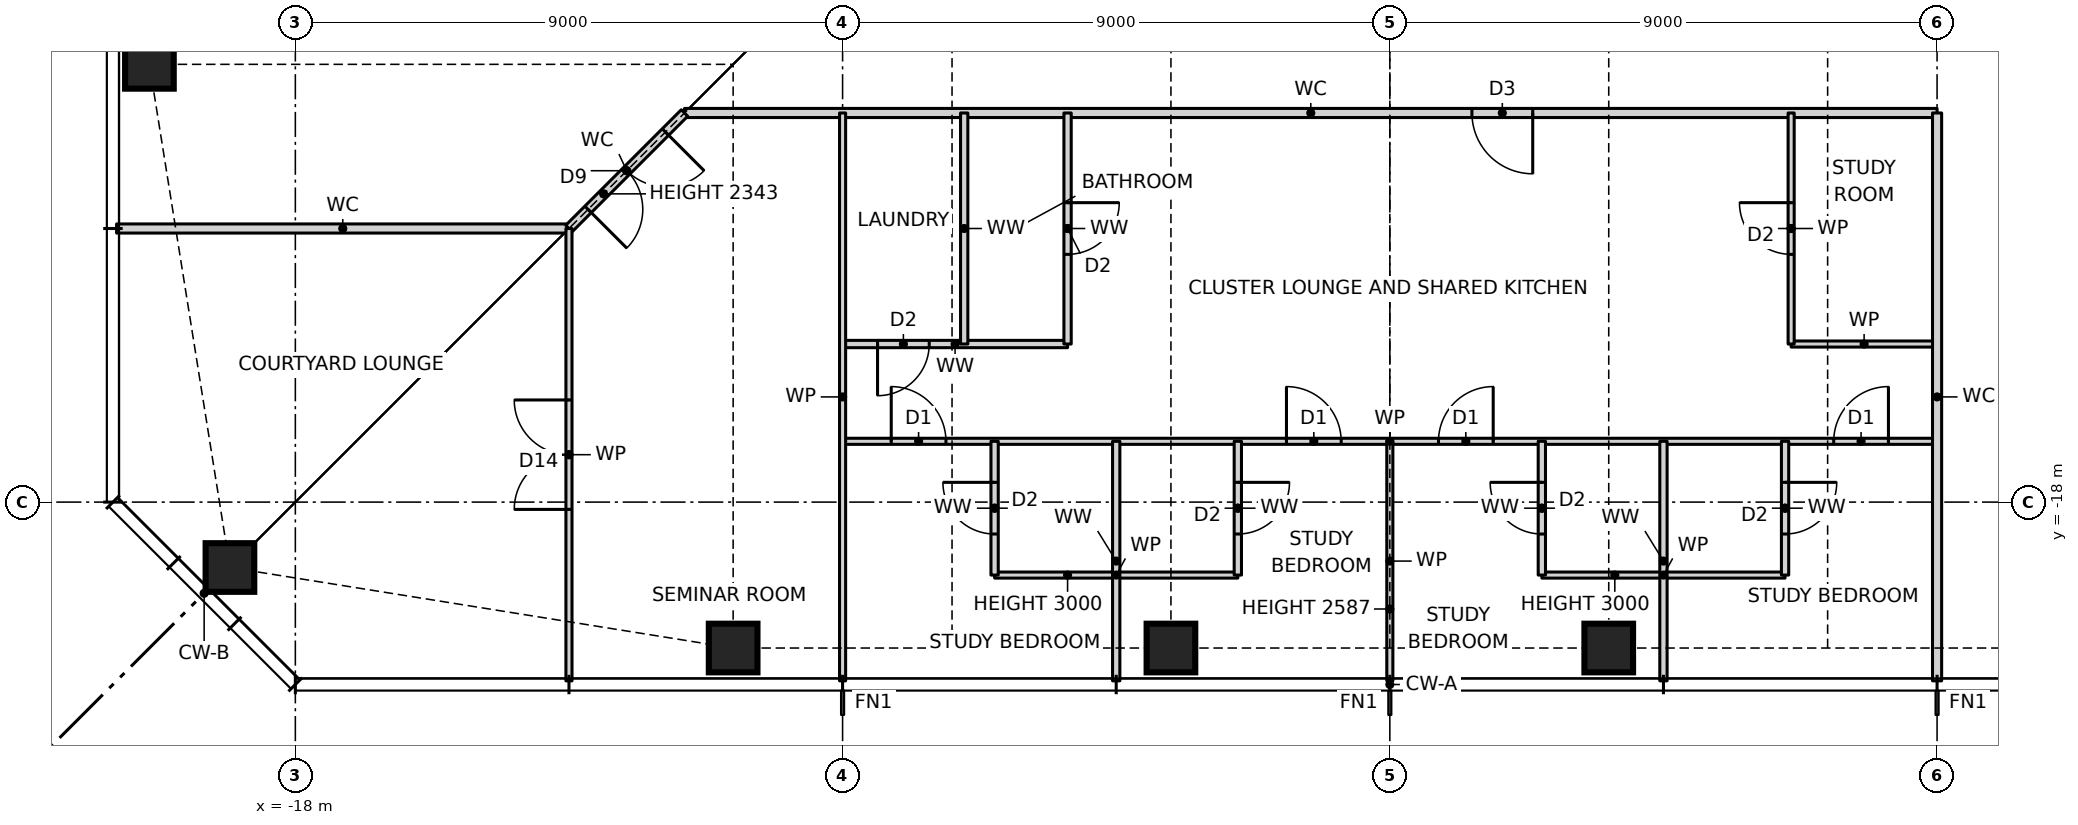
"""IFC4 building model, lengths in metres.
Left out: names, types, materials, properties, quantities, classifications, styles, units other than length and angle.
Written with IfcOpenShell. Run it as: python <this file> out.ifc"""

import sys

from ifc_helpers import new_model, si_unit, direction, frame, frame_2d, origin, origin_2d, place, context, subcontext, project, spatial, rectangle, hollow_rectangle, extrude, element, fill, save


model = new_model("IFC4")
c1 = context("Model", 3, precision=1e-05, world=origin(), true_north=direction((0.0, 1.0)))
c2 = subcontext(c1, "Body", "Model", "MODEL_VIEW")
j1 = project(units=[si_unit("LENGTHUNIT", "METRE"), si_unit("PLANEANGLEUNIT", "RADIAN")], contexts=[c1])
p1 = place(None, origin())
s1 = spatial("IfcSite", under=j1, at=p1, CompositionType="ELEMENT")
p2 = place(p1, origin())
s2 = spatial("IfcBuilding", under=s1, at=p2, CompositionType="ELEMENT")
p3 = place(p2, frame((0.0, 0.0, 94.5)))
s3 = spatial("IfcBuildingStorey", under=s2, at=p3, CompositionType="ELEMENT", Elevation=94.5)
for number, where, z_axis, x_axis in (
    (1, (-19.076, -19.076, 0.0), (0.0, 0.0, 1.0), (1.0, 0.0, 0.0)),
    (2, (-10.8, -20.4, 0.0), (0.0, 0.0, 1.0), (1.0, 0.0, 0.0)),
    (3, (-3.6, -20.4, 0.0), (0.0, 0.0, 1.0), (1.0, 0.0, 0.0)),
    (4, (3.6, -20.4, 0.0), (0.0, 0.0, 1.0), (1.0, 0.0, 0.0)),
    (5, (-20.4, -10.8, 0.0), (0.0, 0.0, 1.0), (1.0, 0.0, 0.0)),
):
    element("IfcColumn", number, at=place(p3, frame(where, z_axis=z_axis, x_axis=x_axis)), inside=s3, PredefinedType="COLUMN", context=c2, shape_type="SweptSolid", body=[
        extrude(hollow_rectangle(XDim=0.8, YDim=0.8, WallThickness=0.07, at=origin_2d()), origin(), (0.0, 0.0, 1.0), 3.5),
    ])
for number, where, z_axis, x_axis in (
    (6, (-6.5, -19.2, 0.0), (0.0, 0.0, 1.0), (1.0, 0.0, 0.0)),
    (7, (2.5, -19.2, 0.0), (0.0, 0.0, 1.0), (1.0, 0.0, 0.0)),
):
    element("IfcWall", number, at=place(p3, frame(where, z_axis=z_axis, x_axis=x_axis)), inside=s3, PredefinedType="PARTITIONING", context=c2, shape_type="SweptSolid", body=[
        extrude(rectangle(XDim=4.0, YDim=0.1, at=frame_2d((2.0, 0.0))), origin(), (0.0, 0.0, 1.0), 3.0),
    ])
p4 = place(p3, frame((-9.0, -17.0, 0.0), z_axis=(0.0, 0.0, 1.0), x_axis=(1.0, 0.0, 0.0)))
e8 = element("IfcWall", 8, at=p4, inside=s3, PredefinedType="PARTITIONING", context=c2, shape_type="SweptSolid", body=[
    extrude(rectangle(XDim=18.0, YDim=0.1, at=frame_2d((9.0, 0.0))), origin(), (0.0, 0.0, 1.0), 3.27),
])
p5 = place(p4, frame((0.8, 0.0, 0.0)))
e9 = element("IfcOpeningElement", 9, at=p5, cuts=e8, PredefinedType="OPENING", context=c2, shape_type="SweptSolid", body=[
    extrude(rectangle(XDim=0.9, YDim=2.1, at=frame_2d((0.45, 1.05))), frame((0.0, 0.06, 0.0), z_axis=(0.0, -1.0, 0.0), x_axis=(1.0, 0.0, 0.0)), (0.0, 0.0, 1.0), 0.12),
])
p6 = place(p4, frame((7.3, 0.0, 0.0)))
e10 = element("IfcOpeningElement", 10, at=p6, cuts=e8, PredefinedType="OPENING", context=c2, shape_type="SweptSolid", body=[
    extrude(rectangle(XDim=0.9, YDim=2.1, at=frame_2d((0.45, 1.05))), frame((0.0, 0.06, 0.0), z_axis=(0.0, -1.0, 0.0), x_axis=(1.0, 0.0, 0.0)), (0.0, 0.0, 1.0), 0.12),
])
p7 = place(p4, frame((9.8, 0.0, 0.0)))
e11 = element("IfcOpeningElement", 11, at=p7, cuts=e8, PredefinedType="OPENING", context=c2, shape_type="SweptSolid", body=[
    extrude(rectangle(XDim=0.9, YDim=2.1, at=frame_2d((0.45, 1.05))), frame((0.0, 0.06, 0.0), z_axis=(0.0, -1.0, 0.0), x_axis=(1.0, 0.0, 0.0)), (0.0, 0.0, 1.0), 0.12),
])
p8 = place(p4, frame((16.3, 0.0, 0.0)))
e12 = element("IfcOpeningElement", 12, at=p8, cuts=e8, PredefinedType="OPENING", context=c2, shape_type="SweptSolid", body=[
    extrude(rectangle(XDim=0.9, YDim=2.1, at=frame_2d((0.45, 1.05))), frame((0.0, 0.06, 0.0), z_axis=(0.0, -1.0, 0.0), x_axis=(1.0, 0.0, 0.0)), (0.0, 0.0, 1.0), 0.12),
])
p9 = place(p3, frame((-9.0, -15.4, 0.0), z_axis=(0.0, 0.0, 1.0), x_axis=(1.0, 0.0, 0.0)))
e13 = element("IfcWall", 13, at=p9, inside=s3, PredefinedType="PARTITIONING", context=c2, shape_type="SweptSolid", body=[
    extrude(rectangle(XDim=3.7, YDim=0.12, at=frame_2d((1.85, 0.0))), origin(), (0.0, 0.0, 1.0), 3.27),
])
p10 = place(p9, frame((0.575, 0.0, 0.0)))
e14 = element("IfcOpeningElement", 14, at=p10, cuts=e13, PredefinedType="OPENING", context=c2, shape_type="SweptSolid", body=[
    extrude(rectangle(XDim=0.85, YDim=2.1, at=frame_2d((0.425, 1.05))), frame((0.0, 0.07, 0.0), z_axis=(0.0, -1.0, 0.0), x_axis=(1.0, 0.0, 0.0)), (0.0, 0.0, 1.0), 0.14),
])
p11 = place(p3, frame((6.6, -15.4, 0.0), z_axis=(0.0, 0.0, 1.0), x_axis=(1.0, 0.0, 0.0)))
e15 = element("IfcWall", 15, at=p11, inside=s3, PredefinedType="PARTITIONING", context=c2, shape_type="SweptSolid", body=[
    extrude(rectangle(XDim=2.4, YDim=0.1, at=frame_2d((1.2, 0.0))), origin(), (0.0, 0.0, 1.0), 3.27),
])
p12 = place(p3, frame((-20.94, -13.5, 0.0), z_axis=(0.0, 0.0, 1.0), x_axis=(1.0, 0.0, 0.0)))
e16 = element("IfcWall", 16, at=p12, inside=s3, PredefinedType="PARTITIONING", context=c2, shape_type="SweptSolid", body=[
    extrude(rectangle(XDim=7.44, YDim=0.15, at=frame_2d((3.72, 0.0))), origin(), (0.0, 0.0, 1.0), 3.27),
])
p13 = place(p3, frame((-11.6, -11.6, 0.0), z_axis=(0.0, 0.0, 1.0), x_axis=(1.0, 0.0, 0.0)))
e17 = element("IfcWall", 17, at=p13, inside=s3, PredefinedType="PARTITIONING", context=c2, shape_type="SweptSolid", body=[
    extrude(rectangle(XDim=20.6, YDim=0.15, at=frame_2d((10.3, 0.0))), origin(), (0.0, 0.0, 1.0), 3.27),
])
p14 = place(p13, frame((12.95, 0.0, 0.0)))
e18 = element("IfcOpeningElement", 18, at=p14, cuts=e17, PredefinedType="OPENING", context=c2, shape_type="SweptSolid", body=[
    extrude(rectangle(XDim=1.0, YDim=2.1, at=frame_2d((0.5, 1.05))), frame((0.0, 0.085, 0.0), z_axis=(0.0, -1.0, 0.0), x_axis=(1.0, 0.0, 0.0)), (0.0, 0.0, 1.0), 0.17),
])
p15 = place(p3, frame((-13.5, -13.5, 0.0), z_axis=(0.0, 0.0, 1.0), x_axis=(0.707106781187, 0.707106781187, 0.0)))
e19 = element("IfcWall", 19, at=p15, inside=s3, PredefinedType="PARTITIONING", context=c2, shape_type="SweptSolid", body=[
    extrude(rectangle(XDim=2.687, YDim=0.15, at=frame_2d((1.343, 0.0))), origin(), (0.0, 0.0, 1.0), 2.343),
])
p16 = place(p15, frame((0.444, 0.0, 0.0)))
e20 = element("IfcOpeningElement", 20, at=p16, cuts=e19, PredefinedType="OPENING", context=c2, shape_type="SweptSolid", body=[
    extrude(rectangle(XDim=1.8, YDim=2.1, at=frame_2d((0.9, 1.05))), frame((0.0, 0.085, 0.0), z_axis=(0.0, -1.0, 0.0), x_axis=(1.0, 0.0, 0.0)), (0.0, 0.0, 1.0), 0.17),
])
p17 = place(p3, frame((9.0, -20.94, 0.0), z_axis=(0.0, 0.0, 1.0), x_axis=(0.0, 1.0, 0.0)))
e21 = element("IfcWall", 21, at=p17, inside=s3, PredefinedType="PARTITIONING", context=c2, shape_type="SweptSolid", body=[
    extrude(rectangle(XDim=9.34, YDim=0.15, at=frame_2d((4.67, 0.0))), origin(), (0.0, 0.0, 1.0), 3.27),
])
p18 = place(p3, frame((6.6, -15.4, 0.0), z_axis=(0.0, 0.0, 1.0), x_axis=(0.0, 1.0, 0.0)))
e22 = element("IfcWall", 22, at=p18, inside=s3, PredefinedType="PARTITIONING", context=c2, shape_type="SweptSolid", body=[
    extrude(rectangle(XDim=3.8, YDim=0.1, at=frame_2d((1.9, 0.0))), origin(), (0.0, 0.0, 1.0), 3.27),
])
p19 = place(p18, frame((1.475, 0.0, 0.0)))
e23 = element("IfcOpeningElement", 23, at=p19, cuts=e22, PredefinedType="OPENING", context=c2, shape_type="SweptSolid", body=[
    extrude(rectangle(XDim=0.85, YDim=2.1, at=frame_2d((0.425, 1.05))), frame((0.0, 0.06, 0.0), z_axis=(0.0, -1.0, 0.0), x_axis=(1.0, 0.0, 0.0)), (0.0, 0.0, 1.0), 0.12),
])
p20 = place(p3, frame((6.5, -19.2, 0.0), z_axis=(0.0, 0.0, 1.0), x_axis=(0.0, 1.0, 0.0)))
e24 = element("IfcWall", 24, at=p20, inside=s3, PredefinedType="PARTITIONING", context=c2, shape_type="SweptSolid", body=[
    extrude(rectangle(XDim=2.2, YDim=0.12, at=frame_2d((1.1, 0.0))), origin(), (0.0, 0.0, 1.0), 3.27),
])
p21 = place(p20, frame((0.675, 0.0, 0.0)))
e25 = element("IfcOpeningElement", 25, at=p21, cuts=e24, PredefinedType="OPENING", context=c2, shape_type="SweptSolid", body=[
    extrude(rectangle(XDim=0.85, YDim=2.1, at=frame_2d((0.425, 1.05))), frame((0.0, 0.07, 0.0), z_axis=(0.0, -1.0, 0.0), x_axis=(1.0, 0.0, 0.0)), (0.0, 0.0, 1.0), 0.14),
])
p22 = place(p3, frame((4.5, -20.94, 0.0), z_axis=(0.0, 0.0, 1.0), x_axis=(0.0, 1.0, 0.0)))
e26 = element("IfcWall", 26, at=p22, inside=s3, PredefinedType="PARTITIONING", context=c2, shape_type="SweptSolid", body=[
    extrude(rectangle(XDim=3.94, YDim=0.12, at=frame_2d((1.97, 0.0))), origin(), (0.0, 0.0, 1.0), 3.27),
])
p23 = place(p3, frame((2.5, -19.2, 0.0), z_axis=(0.0, 0.0, 1.0), x_axis=(0.0, 1.0, 0.0)))
e27 = element("IfcWall", 27, at=p23, inside=s3, PredefinedType="PARTITIONING", context=c2, shape_type="SweptSolid", body=[
    extrude(rectangle(XDim=2.2, YDim=0.12, at=frame_2d((1.1, 0.0))), origin(), (0.0, 0.0, 1.0), 3.27),
])
p24 = place(p23, frame((0.675, 0.0, 0.0)))
e28 = element("IfcOpeningElement", 28, at=p24, cuts=e27, PredefinedType="OPENING", context=c2, shape_type="SweptSolid", body=[
    extrude(rectangle(XDim=0.85, YDim=2.1, at=frame_2d((0.425, 1.05))), frame((0.0, 0.07, 0.0), z_axis=(0.0, -1.0, 0.0), x_axis=(1.0, 0.0, 0.0)), (0.0, 0.0, 1.0), 0.14),
])
p25 = place(p3, frame((0.0, -20.94, 0.0), z_axis=(0.0, 0.0, 1.0), x_axis=(0.0, 1.0, 0.0)))
e29 = element("IfcWall", 29, at=p25, inside=s3, PredefinedType="PARTITIONING", context=c2, shape_type="SweptSolid", body=[
    extrude(rectangle(XDim=3.94, YDim=0.1, at=frame_2d((1.97, 0.0))), origin(), (0.0, 0.0, 1.0), 2.587),
])
p26 = place(p3, frame((-2.5, -19.2, 0.0), z_axis=(0.0, 0.0, 1.0), x_axis=(0.0, 1.0, 0.0)))
e30 = element("IfcWall", 30, at=p26, inside=s3, PredefinedType="PARTITIONING", context=c2, shape_type="SweptSolid", body=[
    extrude(rectangle(XDim=2.2, YDim=0.12, at=frame_2d((1.1, 0.0))), origin(), (0.0, 0.0, 1.0), 3.27),
])
p27 = place(p26, frame((0.675, 0.0, 0.0)))
e31 = element("IfcOpeningElement", 31, at=p27, cuts=e30, PredefinedType="OPENING", context=c2, shape_type="SweptSolid", body=[
    extrude(rectangle(XDim=0.85, YDim=2.1, at=frame_2d((0.425, 1.05))), frame((0.0, 0.07, 0.0), z_axis=(0.0, -1.0, 0.0), x_axis=(1.0, 0.0, 0.0)), (0.0, 0.0, 1.0), 0.14),
])
p28 = place(p3, frame((-4.5, -20.94, 0.0), z_axis=(0.0, 0.0, 1.0), x_axis=(0.0, 1.0, 0.0)))
e32 = element("IfcWall", 32, at=p28, inside=s3, PredefinedType="PARTITIONING", context=c2, shape_type="SweptSolid", body=[
    extrude(rectangle(XDim=3.94, YDim=0.12, at=frame_2d((1.97, 0.0))), origin(), (0.0, 0.0, 1.0), 3.27),
])
p29 = place(p3, frame((-5.3, -15.4, 0.0), z_axis=(0.0, 0.0, 1.0), x_axis=(0.0, 1.0, 0.0)))
e33 = element("IfcWall", 33, at=p29, inside=s3, PredefinedType="PARTITIONING", context=c2, shape_type="SweptSolid", body=[
    extrude(rectangle(XDim=3.8, YDim=0.12, at=frame_2d((1.9, 0.0))), origin(), (0.0, 0.0, 1.0), 3.27),
])
p30 = place(p29, frame((1.475, 0.0, 0.0)))
e34 = element("IfcOpeningElement", 34, at=p30, cuts=e33, PredefinedType="OPENING", context=c2, shape_type="SweptSolid", body=[
    extrude(rectangle(XDim=0.85, YDim=2.1, at=frame_2d((0.425, 1.05))), frame((0.0, 0.07, 0.0), z_axis=(0.0, -1.0, 0.0), x_axis=(1.0, 0.0, 0.0)), (0.0, 0.0, 1.0), 0.14),
])
p31 = place(p3, frame((-6.5, -19.2, 0.0), z_axis=(0.0, 0.0, 1.0), x_axis=(0.0, 1.0, 0.0)))
e35 = element("IfcWall", 35, at=p31, inside=s3, PredefinedType="PARTITIONING", context=c2, shape_type="SweptSolid", body=[
    extrude(rectangle(XDim=2.2, YDim=0.12, at=frame_2d((1.1, 0.0))), origin(), (0.0, 0.0, 1.0), 3.27),
])
p32 = place(p31, frame((0.675, 0.0, 0.0)))
e36 = element("IfcOpeningElement", 36, at=p32, cuts=e35, PredefinedType="OPENING", context=c2, shape_type="SweptSolid", body=[
    extrude(rectangle(XDim=0.85, YDim=2.1, at=frame_2d((0.425, 1.05))), frame((0.0, 0.07, 0.0), z_axis=(0.0, -1.0, 0.0), x_axis=(1.0, 0.0, 0.0)), (0.0, 0.0, 1.0), 0.14),
])
p33 = place(p3, frame((-7.0, -15.4, 0.0), z_axis=(0.0, 0.0, 1.0), x_axis=(0.0, 1.0, 0.0)))
e37 = element("IfcWall", 37, at=p33, inside=s3, PredefinedType="PARTITIONING", context=c2, shape_type="SweptSolid", body=[
    extrude(rectangle(XDim=3.8, YDim=0.12, at=frame_2d((1.9, 0.0))), origin(), (0.0, 0.0, 1.0), 3.27),
])
p34 = place(p3, frame((-9.0, -20.94, 0.0), z_axis=(0.0, 0.0, 1.0), x_axis=(0.0, 1.0, 0.0)))
e38 = element("IfcWall", 38, at=p34, inside=s3, PredefinedType="PARTITIONING", context=c2, shape_type="SweptSolid", body=[
    extrude(rectangle(XDim=9.34, YDim=0.1, at=frame_2d((4.67, 0.0))), origin(), (0.0, 0.0, 1.0), 3.27),
])
p35 = place(p3, frame((-13.5, -20.94, 0.0), z_axis=(0.0, 0.0, 1.0), x_axis=(0.0, 1.0, 0.0)))
e39 = element("IfcWall", 39, at=p35, inside=s3, PredefinedType="PARTITIONING", context=c2, shape_type="SweptSolid", body=[
    extrude(rectangle(XDim=7.44, YDim=0.1, at=frame_2d((3.72, 0.0))), origin(), (0.0, 0.0, 1.0), 3.27),
])
p36 = place(p35, frame((2.82, 0.0, 0.0)))
e40 = element("IfcOpeningElement", 40, at=p36, cuts=e39, PredefinedType="OPENING", context=c2, shape_type="SweptSolid", body=[
    extrude(rectangle(XDim=1.8, YDim=2.1, at=frame_2d((0.9, 1.05))), frame((0.0, 0.06, 0.0), z_axis=(0.0, -1.0, 0.0), x_axis=(1.0, 0.0, 0.0)), (0.0, 0.0, 1.0), 0.12),
])
p37 = place(p16, frame((1.8, 0.0, 0.0), z_axis=(0.0, 0.0, 1.0), x_axis=(-1.0, 0.0, 0.0)))
e41 = element("IfcDoor", 41, at=p37, inside=s3, OperationType="DOUBLE_DOOR_SINGLE_SWING", PredefinedType="DOOR", context=c2, shape_type="SweptSolid", body=[
    extrude(rectangle(XDim=1.8, YDim=2.1, at=frame_2d((0.9, 1.05))), frame((0.0, 0.025, 0.0), z_axis=(0.0, -1.0, 0.0), x_axis=(1.0, 0.0, 0.0)), (0.0, 0.0, 1.0), 0.05),
])
fill(e20, e41)
p38 = place(p32, origin())
e42 = element("IfcDoor", 42, at=p38, inside=s3, OperationType="SINGLE_SWING_RIGHT", PredefinedType="DOOR", context=c2, shape_type="SweptSolid", body=[
    extrude(rectangle(XDim=0.85, YDim=2.1, at=frame_2d((0.425, 1.05))), frame((0.0, 0.025, 0.0), z_axis=(0.0, -1.0, 0.0), x_axis=(1.0, 0.0, 0.0)), (0.0, 0.0, 1.0), 0.05),
])
fill(e36, e42)
p39 = place(p5, origin())
e43 = element("IfcDoor", 43, at=p39, inside=s3, OperationType="SINGLE_SWING_LEFT", PredefinedType="DOOR", context=c2, shape_type="SweptSolid", body=[
    extrude(rectangle(XDim=0.9, YDim=2.1, at=frame_2d((0.45, 1.05))), frame((0.0, 0.025, 0.0), z_axis=(0.0, -1.0, 0.0), x_axis=(1.0, 0.0, 0.0)), (0.0, 0.0, 1.0), 0.05),
])
fill(e9, e43)
p40 = place(p27, frame((0.85, 0.0, 0.0), z_axis=(0.0, 0.0, 1.0), x_axis=(-1.0, 0.0, 0.0)))
e44 = element("IfcDoor", 44, at=p40, inside=s3, OperationType="SINGLE_SWING_LEFT", PredefinedType="DOOR", context=c2, shape_type="SweptSolid", body=[
    extrude(rectangle(XDim=0.85, YDim=2.1, at=frame_2d((0.425, 1.05))), frame((0.0, 0.025, 0.0), z_axis=(0.0, -1.0, 0.0), x_axis=(1.0, 0.0, 0.0)), (0.0, 0.0, 1.0), 0.05),
])
fill(e31, e44)
p41 = place(p6, origin())
e45 = element("IfcDoor", 45, at=p41, inside=s3, OperationType="SINGLE_SWING_LEFT", PredefinedType="DOOR", context=c2, shape_type="SweptSolid", body=[
    extrude(rectangle(XDim=0.9, YDim=2.1, at=frame_2d((0.45, 1.05))), frame((0.0, 0.025, 0.0), z_axis=(0.0, -1.0, 0.0), x_axis=(1.0, 0.0, 0.0)), (0.0, 0.0, 1.0), 0.05),
])
fill(e10, e45)
p42 = place(p24, origin())
e46 = element("IfcDoor", 46, at=p42, inside=s3, OperationType="SINGLE_SWING_RIGHT", PredefinedType="DOOR", context=c2, shape_type="SweptSolid", body=[
    extrude(rectangle(XDim=0.85, YDim=2.1, at=frame_2d((0.425, 1.05))), frame((0.0, 0.025, 0.0), z_axis=(0.0, -1.0, 0.0), x_axis=(1.0, 0.0, 0.0)), (0.0, 0.0, 1.0), 0.05),
])
fill(e28, e46)
p43 = place(p7, origin())
e47 = element("IfcDoor", 47, at=p43, inside=s3, OperationType="SINGLE_SWING_RIGHT", PredefinedType="DOOR", context=c2, shape_type="SweptSolid", body=[
    extrude(rectangle(XDim=0.9, YDim=2.1, at=frame_2d((0.45, 1.05))), frame((0.0, 0.025, 0.0), z_axis=(0.0, -1.0, 0.0), x_axis=(1.0, 0.0, 0.0)), (0.0, 0.0, 1.0), 0.05),
])
fill(e11, e47)
p44 = place(p21, frame((0.85, 0.0, 0.0), z_axis=(0.0, 0.0, 1.0), x_axis=(-1.0, 0.0, 0.0)))
e48 = element("IfcDoor", 48, at=p44, inside=s3, OperationType="SINGLE_SWING_LEFT", PredefinedType="DOOR", context=c2, shape_type="SweptSolid", body=[
    extrude(rectangle(XDim=0.85, YDim=2.1, at=frame_2d((0.425, 1.05))), frame((0.0, 0.025, 0.0), z_axis=(0.0, -1.0, 0.0), x_axis=(1.0, 0.0, 0.0)), (0.0, 0.0, 1.0), 0.05),
])
fill(e25, e48)
p45 = place(p8, origin())
e49 = element("IfcDoor", 49, at=p45, inside=s3, OperationType="SINGLE_SWING_RIGHT", PredefinedType="DOOR", context=c2, shape_type="SweptSolid", body=[
    extrude(rectangle(XDim=0.9, YDim=2.1, at=frame_2d((0.45, 1.05))), frame((0.0, 0.025, 0.0), z_axis=(0.0, -1.0, 0.0), x_axis=(1.0, 0.0, 0.0)), (0.0, 0.0, 1.0), 0.05),
])
fill(e12, e49)
p46 = place(p14, frame((1.0, 0.0, 0.0), z_axis=(0.0, 0.0, 1.0), x_axis=(-1.0, 0.0, 0.0)))
e50 = element("IfcDoor", 50, at=p46, inside=s3, OperationType="SINGLE_SWING_LEFT", PredefinedType="DOOR", context=c2, shape_type="SweptSolid", body=[
    extrude(rectangle(XDim=1.0, YDim=2.1, at=frame_2d((0.5, 1.05))), frame((0.0, 0.025, 0.0), z_axis=(0.0, -1.0, 0.0), x_axis=(1.0, 0.0, 0.0)), (0.0, 0.0, 1.0), 0.05),
])
fill(e18, e50)
p47 = place(p10, frame((0.85, 0.0, 0.0), z_axis=(0.0, 0.0, 1.0), x_axis=(-1.0, 0.0, 0.0)))
e51 = element("IfcDoor", 51, at=p47, inside=s3, OperationType="SINGLE_SWING_RIGHT", PredefinedType="DOOR", context=c2, shape_type="SweptSolid", body=[
    extrude(rectangle(XDim=0.85, YDim=2.1, at=frame_2d((0.425, 1.05))), frame((0.0, 0.025, 0.0), z_axis=(0.0, -1.0, 0.0), x_axis=(1.0, 0.0, 0.0)), (0.0, 0.0, 1.0), 0.05),
])
fill(e14, e51)
p48 = place(p30, frame((0.85, 0.0, 0.0), z_axis=(0.0, 0.0, 1.0), x_axis=(-1.0, 0.0, 0.0)))
e52 = element("IfcDoor", 52, at=p48, inside=s3, OperationType="SINGLE_SWING_LEFT", PredefinedType="DOOR", context=c2, shape_type="SweptSolid", body=[
    extrude(rectangle(XDim=0.85, YDim=2.1, at=frame_2d((0.425, 1.05))), frame((0.0, 0.025, 0.0), z_axis=(0.0, -1.0, 0.0), x_axis=(1.0, 0.0, 0.0)), (0.0, 0.0, 1.0), 0.05),
])
fill(e34, e52)
p49 = place(p19, origin())
e53 = element("IfcDoor", 53, at=p49, inside=s3, OperationType="SINGLE_SWING_RIGHT", PredefinedType="DOOR", context=c2, shape_type="SweptSolid", body=[
    extrude(rectangle(XDim=0.85, YDim=2.1, at=frame_2d((0.425, 1.05))), frame((0.0, 0.025, 0.0), z_axis=(0.0, -1.0, 0.0), x_axis=(1.0, 0.0, 0.0)), (0.0, 0.0, 1.0), 0.05),
])
fill(e23, e53)
p50 = place(p36, origin())
e54 = element("IfcDoor", 54, at=p50, inside=s3, OperationType="DOUBLE_DOOR_SINGLE_SWING", PredefinedType="DOOR", context=c2, shape_type="SweptSolid", body=[
    extrude(rectangle(XDim=1.8, YDim=2.1, at=frame_2d((0.9, 1.05))), frame((0.0, 0.025, 0.0), z_axis=(0.0, -1.0, 0.0), x_axis=(1.0, 0.0, 0.0)), (0.0, 0.0, 1.0), 0.05),
])
fill(e40, e54)
save(model, sys.argv[1])
